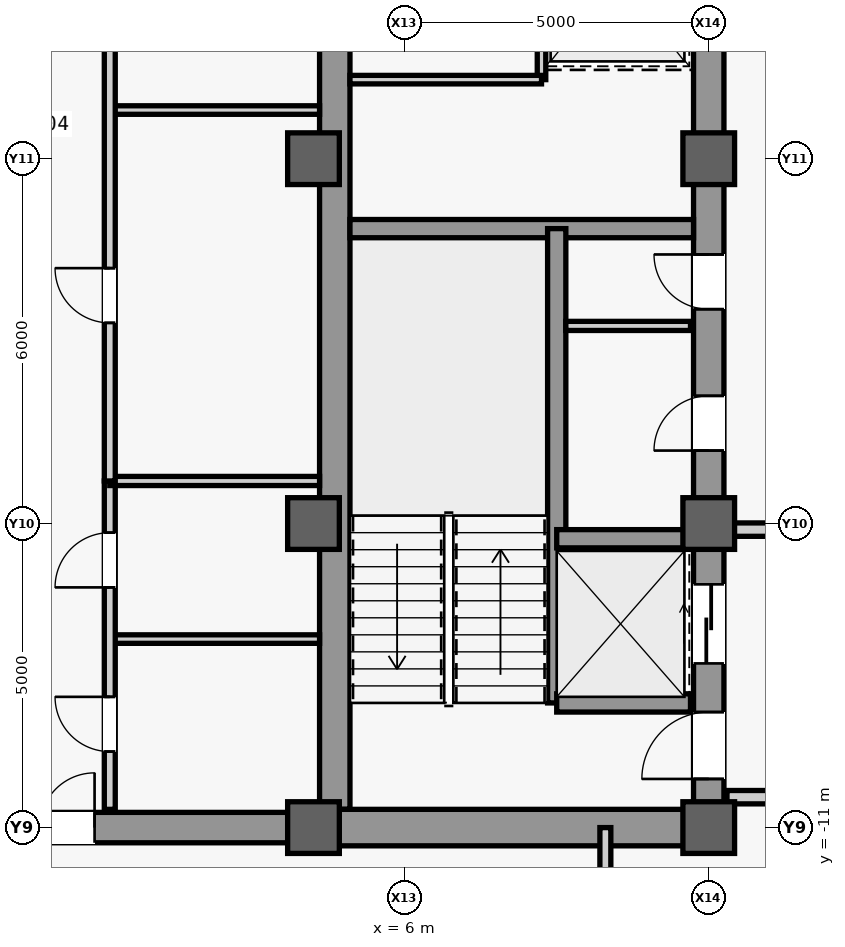
"""IFC4 building model, lengths in metres.
Left out: names, types, materials, properties, quantities, classifications, styles, units other than length and angle.
Written with IfcOpenShell. Run it as: python <this file> out.ifc"""

import sys

from ifc_helpers import new_model, si_unit, direction, frame, frame_2d, origin, origin_2d, place, context, subcontext, project, spatial, rectangle, extrude, source, transform, mapped, element, fill, save


model = new_model("IFC4")
c1 = context("Model", 3, precision=1e-05, world=origin(), true_north=direction((0.0, 1.0)))
c2 = subcontext(c1, "Body", "Model", "MODEL_VIEW")
j1 = project(units=[si_unit("LENGTHUNIT", "METRE"), si_unit("PLANEANGLEUNIT", "RADIAN")], contexts=[c1])
p1 = place(None, origin())
s1 = spatial("IfcSite", under=j1, at=p1, CompositionType="ELEMENT")
p2 = place(p1, origin())
s2 = spatial("IfcBuilding", under=s1, at=p2, CompositionType="ELEMENT")
p3 = place(p2, frame((0.0, 0.0, 235.1)))
s3 = spatial("IfcBuildingStorey", under=s2, at=p3, CompositionType="ELEMENT", Elevation=235.1)
m1 = source(origin(), c2, "Body", "SweptSolid", [
    extrude(rectangle(XDim=22.0, YDim=0.5, at=frame_2d((11.0, 0.0))), origin(), (0.0, 0.0, 1.0), 3.78),
])
p4 = place(p3, frame((11.0, -11.0, 0.0), z_axis=(0.0, 0.0, 1.0), x_axis=(0.0, 1.0, 0.0)))
e1 = element("IfcWall", 1, at=p4, inside=s3, PredefinedType="SHEAR", context=c2, shape_type="MappedRepresentation", body=[
    mapped(m1, transform((0.0, 0.0, 0.0), scale=1.0)),
])
m2 = source(origin(), c2, "Body", "SweptSolid", [
    extrude(rectangle(XDim=1.1, YDim=2.2, at=frame_2d((0.55, 1.1))), frame((0.0, 0.26, 0.0), z_axis=(0.0, -1.0, 0.0), x_axis=(1.0, 0.0, 0.0)), (0.0, 0.0, 1.0), 0.52),
])
p5 = place(p4, frame((0.8, 0.0, 0.0)))
e2 = element("IfcOpeningElement", 2, at=p5, cuts=e1, PredefinedType="OPENING", context=c2, shape_type="MappedRepresentation", body=[
    mapped(m2, transform((0.0, 0.0, 0.0), scale=1.0)),
])
m3 = source(origin(), c2, "Body", "SweptSolid", [
    extrude(rectangle(XDim=0.9, YDim=2.15, at=frame_2d((0.45, 1.075))), frame((0.0, 0.26, 0.0), z_axis=(0.0, -1.0, 0.0), x_axis=(1.0, 0.0, 0.0)), (0.0, 0.0, 1.0), 0.52),
])
p6 = place(p4, frame((6.2, 0.0, 0.0)))
e3 = element("IfcOpeningElement", 3, at=p6, cuts=e1, PredefinedType="OPENING", context=c2, shape_type="MappedRepresentation", body=[
    mapped(m3, transform((0.0, 0.0, 0.0), scale=1.0)),
])
p7 = place(p4, frame((8.525, 0.0, 0.0)))
e4 = element("IfcOpeningElement", 4, at=p7, cuts=e1, PredefinedType="OPENING", context=c2, shape_type="MappedRepresentation", body=[
    mapped(m3, transform((0.0, 0.0, 0.0), scale=1.0)),
])
m4 = source(origin(), c2, "Body", "SweptSolid", [
    extrude(rectangle(XDim=1.3, YDim=2.3, at=frame_2d((0.65, 1.15))), frame((0.0, 0.26, 0.0), z_axis=(0.0, -1.0, 0.0), x_axis=(1.0, 0.0, 0.0)), (0.0, 0.0, 1.0), 0.52),
])
p8 = place(p4, frame((2.7, 0.0, 0.0)))
e5 = element("IfcOpeningElement", 5, at=p8, cuts=e1, PredefinedType="OPENING", context=c2, shape_type="MappedRepresentation", body=[
    mapped(m4, transform((0.0, 0.0, 0.0), scale=1.0)),
])
p9 = place(p4, frame((13.35, 0.0, 0.0)))
e6 = element("IfcOpeningElement", 6, at=p9, cuts=e1, PredefinedType="OPENING", context=c2, shape_type="MappedRepresentation", body=[
    mapped(m4, transform((0.0, 0.0, 0.0), scale=1.0)),
])
m5 = source(origin(), c2, "Body", "SweptSolid", [
    extrude(rectangle(XDim=21.4, YDim=0.5, at=frame_2d((10.7, 0.0))), origin(), (0.0, 0.0, 1.0), 3.78),
])
p10 = place(p3, frame((4.85, -10.7, 0.0), z_axis=(0.0, 0.0, 1.0), x_axis=(0.0, 1.0, 0.0)))
e7 = element("IfcWall", 7, at=p10, inside=s3, PredefinedType="SHEAR", context=c2, shape_type="MappedRepresentation", body=[
    mapped(m5, transform((0.0, 0.0, 0.0), scale=1.0)),
])
m6 = source(origin(), c2, "Body", "SweptSolid", [
    extrude(rectangle(XDim=5.9, YDim=0.6, at=frame_2d((2.95, 0.0))), origin(), (0.0, 0.0, 1.0), 3.78),
])
p11 = place(p3, frame((4.85, -11.0, 0.0), z_axis=(0.0, 0.0, 1.0), x_axis=(1.0, 0.0, 0.0)))
e8 = element("IfcWall", 8, at=p11, inside=s3, PredefinedType="SHEAR", context=c2, shape_type="MappedRepresentation", body=[
    mapped(m6, transform((0.0, 0.0, 0.0), scale=1.0)),
])
m7 = source(origin(), c2, "Body", "SweptSolid", [
    extrude(rectangle(XDim=5.65, YDim=0.3, at=frame_2d((2.825, 0.0))), origin(), (0.0, 0.0, 1.0), 3.78),
])
p12 = place(p3, frame((5.1, -1.15, 0.0), z_axis=(0.0, 0.0, 1.0), x_axis=(1.0, 0.0, 0.0)))
e9 = element("IfcWall", 9, at=p12, inside=s3, PredefinedType="SHEAR", context=c2, shape_type="MappedRepresentation", body=[
    mapped(m7, transform((0.0, 0.0, 0.0), scale=1.0)),
])
m8 = source(origin(), c2, "Body", "SweptSolid", [
    extrude(rectangle(XDim=9.2, YDim=0.5, at=frame_2d((4.6, 0.0))), origin(), (0.0, 0.0, 1.0), 3.78),
])
p13 = place(p3, frame((-4.6, -11.0, 0.0), z_axis=(0.0, 0.0, 1.0), x_axis=(1.0, 0.0, 0.0)))
e10 = element("IfcWall", 10, at=p13, inside=s3, PredefinedType="SHEAR", context=c2, shape_type="MappedRepresentation", body=[
    mapped(m8, transform((0.0, 0.0, 0.0), scale=1.0)),
])
m9 = source(origin(), c2, "Body", "SweptSolid", [
    extrude(rectangle(XDim=1.8, YDim=2.25, at=frame_2d((0.9, 1.125))), frame((0.0, 0.26, 0.0), z_axis=(0.0, -1.0, 0.0), x_axis=(1.0, 0.0, 0.0)), (0.0, 0.0, 1.0), 0.52),
])
p14 = place(p13, frame((3.7, 0.0, 0.0)))
e11 = element("IfcOpeningElement", 11, at=p14, cuts=e10, PredefinedType="OPENING", context=c2, shape_type="MappedRepresentation", body=[
    mapped(m9, transform((0.0, 0.0, 0.0), scale=1.0)),
])
m10 = source(origin(), c2, "Body", "SweptSolid", [
    extrude(rectangle(XDim=0.85, YDim=0.85, at=origin_2d()), origin(), (0.0, 0.0, 1.0), 4.0),
])
for number, where, z_axis, x_axis in (
    (12, (4.5, -11.0, 0.0), (0.0, 0.0, 1.0), (1.0, 0.0, 0.0)),
    (13, (4.5, -6.0, 0.0), (0.0, 0.0, 1.0), (1.0, 0.0, 0.0)),
    (14, (4.5, 0.0, 0.0), (0.0, 0.0, 1.0), (1.0, 0.0, 0.0)),
    (15, (11.0, -11.0, 0.0), (0.0, 0.0, 1.0), (1.0, 0.0, 0.0)),
    (16, (11.0, -6.0, 0.0), (0.0, 0.0, 1.0), (1.0, 0.0, 0.0)),
    (17, (11.0, 0.0, 0.0), (0.0, 0.0, 1.0), (1.0, 0.0, 0.0)),
):
    element("IfcColumn", number, at=place(p3, frame(where, z_axis=z_axis, x_axis=x_axis)), inside=s3, PredefinedType="COLUMN", context=c2, shape_type="MappedRepresentation", body=[
        mapped(m10, transform((0.0, 0.0, 0.0), scale=1.0)),
    ])
m11 = source(origin(), c2, "Body", "SweptSolid", [
    extrude(rectangle(XDim=7.8, YDim=0.3, at=frame_2d((3.9, 0.0))), origin(), (0.0, 0.0, 1.0), 3.78),
])
p15 = place(p3, frame((8.5, -8.95, 0.0), z_axis=(0.0, 0.0, 1.0), x_axis=(0.0, 1.0, 0.0)))
e18 = element("IfcWall", 18, at=p15, inside=s3, PredefinedType="SHEAR", context=c2, shape_type="MappedRepresentation", body=[
    mapped(m11, transform((0.0, 0.0, 0.0), scale=1.0)),
])
m12 = source(origin(), c2, "Body", "SweptSolid", [
    extrude(rectangle(XDim=2.2, YDim=0.3, at=frame_2d((1.1, 0.0))), origin(), (0.0, 0.0, 1.0), 3.78),
])
for number, where, z_axis, x_axis in (
    (19, (8.5, -8.95, 0.0), (0.0, 0.0, 1.0), (1.0, 0.0, 0.0)),
    (20, (8.5, -6.25, 0.0), (0.0, 0.0, 1.0), (1.0, 0.0, 0.0)),
):
    element("IfcWall", number, at=place(p3, frame(where, z_axis=z_axis, x_axis=x_axis)), inside=s3, PredefinedType="SHEAR", context=c2, shape_type="MappedRepresentation", body=[
        mapped(m12, transform((0.0, 0.0, 0.0), scale=1.0)),
    ])
m13 = source(origin(), c2, "Body", "SweptSolid", [
    extrude(rectangle(XDim=2.05, YDim=0.15, at=frame_2d((1.025, 0.0))), origin(), (0.0, 0.0, 1.0), 3.78),
])
p16 = place(p3, frame((8.65, -2.75, 0.0), z_axis=(0.0, 0.0, 1.0), x_axis=(1.0, 0.0, 0.0)))
e21 = element("IfcWall", 21, at=p16, inside=s3, PredefinedType="PARTITIONING", context=c2, shape_type="MappedRepresentation", body=[
    mapped(m13, transform((0.0, 0.0, 0.0), scale=1.0)),
])
m14 = source(origin(), c2, "Body", "SweptSolid", [
    extrude(rectangle(XDim=9.4, YDim=0.14, at=frame_2d((4.7, 0.0))), origin(), (0.0, 0.0, 1.0), 3.78),
])
p17 = place(p3, frame((8.25, 1.3, 0.0), z_axis=(0.0, 0.0, 1.0), x_axis=(0.0, 1.0, 0.0)))
e22 = element("IfcWall", 22, at=p17, inside=s3, PredefinedType="PARTITIONING", context=c2, shape_type="MappedRepresentation", body=[
    mapped(m14, transform((0.0, 0.0, 0.0), scale=1.0)),
])
m15 = source(origin(), c2, "Body", "SweptSolid", [
    extrude(rectangle(XDim=3.15, YDim=0.14, at=frame_2d((1.575, 0.0))), origin(), (0.0, 0.0, 1.0), 3.78),
])
p18 = place(p3, frame((5.1, 1.3, 0.0), z_axis=(0.0, 0.0, 1.0), x_axis=(1.0, 0.0, 0.0)))
e23 = element("IfcWall", 23, at=p18, inside=s3, PredefinedType="PARTITIONING", context=c2, shape_type="MappedRepresentation", body=[
    mapped(m15, transform((0.0, 0.0, 0.0), scale=1.0)),
])
m16 = source(origin(), c2, "Body", "SweptSolid", [
    extrude(rectangle(XDim=4.05, YDim=0.22, at=frame_2d((2.025, 0.0))), origin(), (0.0, 0.0, 1.0), 3.78),
])
p19 = place(p3, frame((11.3, -10.5, 0.0), z_axis=(0.0, 0.0, 1.0), x_axis=(1.0, 0.0, 0.0)))
e24 = element("IfcWall", 24, at=p19, inside=s3, PredefinedType="PARTITIONING", context=c2, shape_type="MappedRepresentation", body=[
    mapped(m16, transform((0.0, 0.0, 0.0), scale=1.0)),
])
m17 = source(origin(), c2, "Body", "SweptSolid", [
    extrude(rectangle(XDim=4.05, YDim=0.22, at=frame_2d((2.025, 0.0))), origin(), (0.0, 0.0, 1.0), 3.085),
])
p20 = place(p3, frame((11.3, -6.1, 0.0), z_axis=(0.0, 0.0, 1.0), x_axis=(1.0, 0.0, 0.0)))
e25 = element("IfcWall", 25, at=p20, inside=s3, PredefinedType="PARTITIONING", context=c2, shape_type="MappedRepresentation", body=[
    mapped(m17, transform((0.0, 0.0, 0.0), scale=1.0)),
])
m18 = source(origin(), c2, "Body", "SweptSolid", [
    extrude(rectangle(XDim=3.45, YDim=0.14, at=frame_2d((1.725, 0.0))), origin(), (0.0, 0.0, 1.0), 3.78),
])
p21 = place(p3, frame((1.15, -7.9, 0.0), z_axis=(0.0, 0.0, 1.0), x_axis=(1.0, 0.0, 0.0)))
e26 = element("IfcWall", 26, at=p21, inside=s3, PredefinedType="PARTITIONING", context=c2, shape_type="MappedRepresentation", body=[
    mapped(m18, transform((0.0, 0.0, 0.0), scale=1.0)),
])
m19 = source(origin(), c2, "Body", "SweptSolid", [
    extrude(rectangle(XDim=5.4, YDim=0.18, at=frame_2d((2.7, 0.0))), origin(), (0.0, 0.0, 1.0), 3.78),
])
p22 = place(p3, frame((1.15, -10.7, 0.0), z_axis=(0.0, 0.0, 1.0), x_axis=(0.0, 1.0, 0.0)))
e27 = element("IfcWall", 27, at=p22, inside=s3, PredefinedType="PARTITIONING", context=c2, shape_type="MappedRepresentation", body=[
    mapped(m19, transform((0.0, 0.0, 0.0), scale=1.0)),
])
m20 = source(origin(), c2, "Body", "SweptSolid", [
    extrude(rectangle(XDim=0.9, YDim=2.15, at=frame_2d((0.45, 1.075))), frame((0.0, 0.1, 0.0), z_axis=(0.0, -1.0, 0.0), x_axis=(1.0, 0.0, 0.0)), (0.0, 0.0, 1.0), 0.2),
])
p23 = place(p22, frame((0.95, 0.0, 0.0)))
e28 = element("IfcOpeningElement", 28, at=p23, cuts=e27, PredefinedType="OPENING", context=c2, shape_type="MappedRepresentation", body=[
    mapped(m20, transform((0.0, 0.0, 0.0), scale=1.0)),
])
p24 = place(p22, frame((3.65, 0.0, 0.0)))
e29 = element("IfcOpeningElement", 29, at=p24, cuts=e27, PredefinedType="OPENING", context=c2, shape_type="MappedRepresentation", body=[
    mapped(m20, transform((0.0, 0.0, 0.0), scale=1.0)),
])
m21 = source(origin(), c2, "Body", "SweptSolid", [
    extrude(rectangle(XDim=3.45, YDim=0.15, at=frame_2d((1.725, 0.0))), origin(), (0.0, 0.0, 1.0), 3.78),
])
p25 = place(p3, frame((1.15, -5.3, 0.0), z_axis=(0.0, 0.0, 1.0), x_axis=(1.0, 0.0, 0.0)))
e30 = element("IfcWall", 30, at=p25, inside=s3, PredefinedType="PARTITIONING", context=c2, shape_type="MappedRepresentation", body=[
    mapped(m21, transform((0.0, 0.0, 0.0), scale=1.0)),
])
p26 = place(p3, frame((1.15, 0.8, 0.0), z_axis=(0.0, 0.0, 1.0), x_axis=(1.0, 0.0, 0.0)))
e31 = element("IfcWall", 31, at=p26, inside=s3, PredefinedType="PARTITIONING", context=c2, shape_type="MappedRepresentation", body=[
    mapped(m18, transform((0.0, 0.0, 0.0), scale=1.0)),
])
m22 = source(origin(), c2, "Body", "SweptSolid", [
    extrude(rectangle(XDim=10.6, YDim=0.18, at=frame_2d((5.3, 0.0))), origin(), (0.0, 0.0, 1.0), 3.78),
])
p27 = place(p3, frame((1.15, -5.3, 0.0), z_axis=(0.0, 0.0, 1.0), x_axis=(0.0, 1.0, 0.0)))
e32 = element("IfcWall", 32, at=p27, inside=s3, PredefinedType="PARTITIONING", context=c2, shape_type="MappedRepresentation", body=[
    mapped(m22, transform((0.0, 0.0, 0.0), scale=1.0)),
])
p28 = place(p27, frame((2.6, 0.0, 0.0)))
e33 = element("IfcOpeningElement", 33, at=p28, cuts=e32, PredefinedType="OPENING", context=c2, shape_type="MappedRepresentation", body=[
    mapped(m20, transform((0.0, 0.0, 0.0), scale=1.0)),
])
p29 = place(p27, frame((7.25, 0.0, 0.0)))
e34 = element("IfcOpeningElement", 34, at=p29, cuts=e32, PredefinedType="OPENING", context=c2, shape_type="MappedRepresentation", body=[
    mapped(m20, transform((0.0, 0.0, 0.0), scale=1.0)),
])
p30 = place(p27, frame((9.475, 0.0, 0.0)))
e35 = element("IfcOpeningElement", 35, at=p30, cuts=e32, PredefinedType="OPENING", context=c2, shape_type="MappedRepresentation", body=[
    mapped(m20, transform((0.0, 0.0, 0.0), scale=1.0)),
])
m23 = source(origin(), c2, "Body", "SweptSolid", [
    extrude(rectangle(XDim=3.2, YDim=0.18, at=frame_2d((1.6, 0.0))), origin(), (0.0, 0.0, 1.0), 3.78),
])
p31 = place(p3, frame((9.3, -14.2, 0.0), z_axis=(0.0, 0.0, 1.0), x_axis=(0.0, 1.0, 0.0)))
e36 = element("IfcWall", 36, at=p31, inside=s3, PredefinedType="PARTITIONING", context=c2, shape_type="MappedRepresentation", body=[
    mapped(m23, transform((0.0, 0.0, 0.0), scale=1.0)),
])
m24 = source(origin(), c2, "Body", "SweptSolid", [
    extrude(rectangle(XDim=1.1, YDim=2.2, at=frame_2d((0.55, 1.1))), frame((0.0, 0.025, 0.0), z_axis=(0.0, -1.0, 0.0), x_axis=(1.0, 0.0, 0.0)), (0.0, 0.0, 1.0), 0.05),
])
p32 = place(p5, origin())
e37 = element("IfcDoor", 37, at=p32, inside=s3, OperationType="SINGLE_SWING_LEFT", PredefinedType="DOOR", context=c2, shape_type="MappedRepresentation", body=[
    mapped(m24, transform((0.0, 0.0, 0.0), scale=1.0)),
])
fill(e2, e37)
m25 = source(origin(), c2, "Body", "SweptSolid", [
    extrude(rectangle(XDim=0.9, YDim=2.15, at=frame_2d((0.45, 1.075))), frame((0.0, 0.025, 0.0), z_axis=(0.0, -1.0, 0.0), x_axis=(1.0, 0.0, 0.0)), (0.0, 0.0, 1.0), 0.05),
])
p33 = place(p6, origin())
e38 = element("IfcDoor", 38, at=p33, inside=s3, OperationType="SINGLE_SWING_LEFT", PredefinedType="DOOR", context=c2, shape_type="MappedRepresentation", body=[
    mapped(m25, transform((0.0, 0.0, 0.0), scale=1.0)),
])
fill(e3, e38)
p34 = place(p7, origin())
e39 = element("IfcDoor", 39, at=p34, inside=s3, OperationType="SINGLE_SWING_RIGHT", PredefinedType="DOOR", context=c2, shape_type="MappedRepresentation", body=[
    mapped(m25, transform((0.0, 0.0, 0.0), scale=1.0)),
])
fill(e4, e39)
p35 = place(p23, origin())
e40 = element("IfcDoor", 40, at=p35, inside=s3, OperationType="SINGLE_SWING_RIGHT", PredefinedType="DOOR", context=c2, shape_type="MappedRepresentation", body=[
    mapped(m25, transform((0.0, 0.0, 0.0), scale=1.0)),
])
fill(e28, e40)
p36 = place(p24, origin())
e41 = element("IfcDoor", 41, at=p36, inside=s3, OperationType="SINGLE_SWING_LEFT", PredefinedType="DOOR", context=c2, shape_type="MappedRepresentation", body=[
    mapped(m25, transform((0.0, 0.0, 0.0), scale=1.0)),
])
fill(e29, e41)
m26 = source(origin(), c2, "Body", "SweptSolid", [
    extrude(rectangle(XDim=1.8, YDim=2.25, at=frame_2d((0.9, 1.125))), frame((0.0, 0.025, 0.0), z_axis=(0.0, -1.0, 0.0), x_axis=(1.0, 0.0, 0.0)), (0.0, 0.0, 1.0), 0.05),
])
p37 = place(p14, origin())
e42 = element("IfcDoor", 42, at=p37, inside=s3, OperationType="SINGLE_SWING_LEFT", PredefinedType="DOOR", context=c2, shape_type="MappedRepresentation", body=[
    mapped(m26, transform((0.0, 0.0, 0.0), scale=1.0)),
])
fill(e11, e42)
p38 = place(p28, origin())
e43 = element("IfcDoor", 43, at=p38, inside=s3, OperationType="SINGLE_SWING_RIGHT", PredefinedType="DOOR", context=c2, shape_type="MappedRepresentation", body=[
    mapped(m25, transform((0.0, 0.0, 0.0), scale=1.0)),
])
fill(e33, e43)
m27 = source(origin(), c2, "Body", "SweptSolid", [
    extrude(rectangle(XDim=1.3, YDim=2.3, at=frame_2d((0.65, 1.15))), frame((0.0, 0.025, 0.0), z_axis=(0.0, -1.0, 0.0), x_axis=(1.0, 0.0, 0.0)), (0.0, 0.0, 1.0), 0.05),
])
p39 = place(p8, origin())
e44 = element("IfcDoor", 44, at=p39, inside=s3, OperationType="SLIDING_TO_LEFT", PredefinedType="DOOR", context=c2, shape_type="MappedRepresentation", body=[
    mapped(m27, transform((0.0, 0.0, 0.0), scale=1.0)),
])
fill(e5, e44)
save(model, sys.argv[1])
